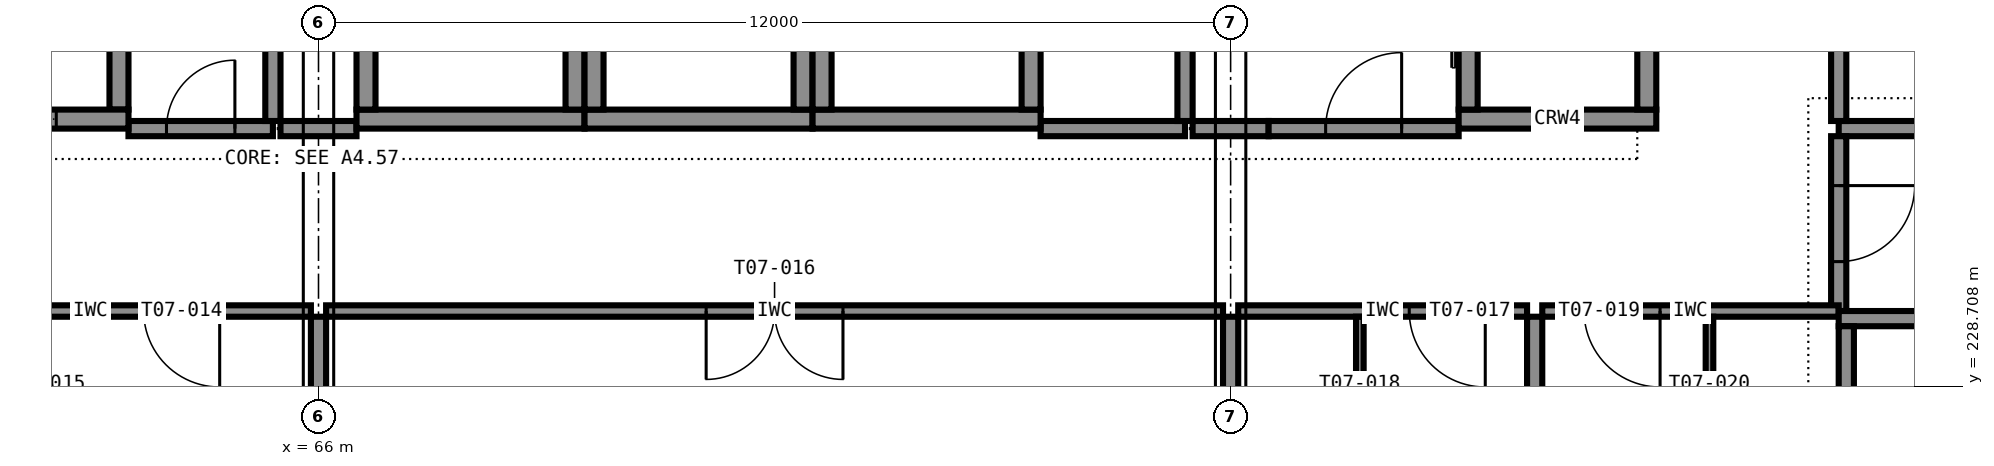
"""IFC4 building model, lengths in metres.
Left out: names, types, materials, properties, quantities, classifications, styles, units other than length and angle.
Written with IfcOpenShell. Run it as: python <this file> out.ifc"""

import sys

from ifc_helpers import new_model, si_unit, direction, frame, frame_2d, origin, place, context, subcontext, project, spatial, rectangle, extrude, element, fill, save


model = new_model("IFC4")
c1 = context("Model", 3, precision=1e-05, world=origin(), true_north=direction((0.0, 1.0)))
c2 = subcontext(c1, "Body", "Model", "MODEL_VIEW")
j1 = project(units=[si_unit("LENGTHUNIT", "METRE"), si_unit("PLANEANGLEUNIT", "RADIAN")], contexts=[c1])
p1 = place(None, origin())
s1 = spatial("IfcSite", under=j1, at=p1, CompositionType="ELEMENT")
p2 = place(p1, origin())
s2 = spatial("IfcBuilding", under=s1, at=p2, CompositionType="ELEMENT")
p3 = place(p2, frame((0.0, 0.0, 31.8)))
s3 = spatial("IfcBuildingStorey", under=s2, at=p3, CompositionType="ELEMENT", Elevation=31.8)
p4 = place(p3, frame((60.5, 232.225, 0.0), z_axis=(0.0, 0.0, 1.0), x_axis=(1.0, 0.0, 0.0)))
e1 = element("IfcWall", 1, at=p4, inside=s3, PredefinedType="SHEAR", context=c2, shape_type="SweptSolid", body=[
    extrude(rectangle(XDim=3.0, YDim=0.25, at=frame_2d((1.5, 0.0))), origin(), (0.0, 0.0, 1.0), 3.6),
])
p5 = place(p4, frame((0.95, 0.0, 0.0)))
e2 = element("IfcOpeningElement", 2, at=p5, cuts=e1, PredefinedType="OPENING", context=c2, shape_type="SweptSolid", body=[
    extrude(rectangle(XDim=1.1, YDim=2.1, at=frame_2d((0.55, 1.05))), frame((0.0, 0.135, 0.0), z_axis=(0.0, -1.0, 0.0), x_axis=(1.0, 0.0, 0.0)), (0.0, 0.0, 1.0), 0.27),
])
p6 = place(p3, frame((63.375, 232.35, 0.0), z_axis=(0.0, 0.0, 1.0), x_axis=(0.0, 1.0, 0.0)))
e3 = element("IfcWall", 3, at=p6, inside=s3, PredefinedType="SHEAR", context=c2, shape_type="SweptSolid", body=[
    extrude(rectangle(XDim=3.3, YDim=0.25, at=frame_2d((1.65, 0.0))), origin(), (0.0, 0.0, 1.0), 3.6),
])
p7 = place(p3, frame((66.5, 232.225, 0.0), z_axis=(0.0, 0.0, 1.0), x_axis=(1.0, 0.0, 0.0)))
e4 = element("IfcWall", 4, at=p7, inside=s3, PredefinedType="SHEAR", context=c2, shape_type="SweptSolid", body=[
    extrude(rectangle(XDim=3.0, YDim=0.25, at=frame_2d((1.5, 0.0))), origin(), (0.0, 0.0, 1.0), 3.6),
])
for number, where, z_axis, x_axis in (
    (5, (66.625, 232.35, 0.0), (0.0, 0.0, 1.0), (0.0, 1.0, 0.0)),
    (6, (69.375, 232.35, 0.0), (0.0, 0.0, 1.0), (0.0, 1.0, 0.0)),
):
    element("IfcWall", number, at=place(p3, frame(where, z_axis=z_axis, x_axis=x_axis)), inside=s3, PredefinedType="SHEAR", context=c2, shape_type="SweptSolid", body=[
        extrude(rectangle(XDim=3.3, YDim=0.25, at=frame_2d((1.65, 0.0))), origin(), (0.0, 0.0, 1.0), 3.6),
    ])
p8 = place(p3, frame((69.5, 232.225, 0.0), z_axis=(0.0, 0.0, 1.0), x_axis=(1.0, 0.0, 0.0)))
e7 = element("IfcWall", 7, at=p8, inside=s3, PredefinedType="SHEAR", context=c2, shape_type="SweptSolid", body=[
    extrude(rectangle(XDim=3.0, YDim=0.25, at=frame_2d((1.5, 0.0))), origin(), (0.0, 0.0, 1.0), 3.6),
])
for number, where, z_axis, x_axis in (
    (8, (69.625, 232.35, 0.0), (0.0, 0.0, 1.0), (0.0, 1.0, 0.0)),
    (9, (72.375, 232.35, 0.0), (0.0, 0.0, 1.0), (0.0, 1.0, 0.0)),
):
    element("IfcWall", number, at=place(p3, frame(where, z_axis=z_axis, x_axis=x_axis)), inside=s3, PredefinedType="SHEAR", context=c2, shape_type="SweptSolid", body=[
        extrude(rectangle(XDim=3.3, YDim=0.25, at=frame_2d((1.65, 0.0))), origin(), (0.0, 0.0, 1.0), 3.6),
    ])
p9 = place(p3, frame((72.5, 232.225, 0.0), z_axis=(0.0, 0.0, 1.0), x_axis=(1.0, 0.0, 0.0)))
e10 = element("IfcWall", 10, at=p9, inside=s3, PredefinedType="SHEAR", context=c2, shape_type="SweptSolid", body=[
    extrude(rectangle(XDim=3.0, YDim=0.25, at=frame_2d((1.5, 0.0))), origin(), (0.0, 0.0, 1.0), 3.6),
])
for number, where, z_axis, x_axis in (
    (11, (72.625, 232.35, 0.0), (0.0, 0.0, 1.0), (0.0, 1.0, 0.0)),
    (12, (75.375, 232.35, 0.0), (0.0, 0.0, 1.0), (0.0, 1.0, 0.0)),
):
    element("IfcWall", number, at=place(p3, frame(where, z_axis=z_axis, x_axis=x_axis)), inside=s3, PredefinedType="SHEAR", context=c2, shape_type="SweptSolid", body=[
        extrude(rectangle(XDim=3.3, YDim=0.25, at=frame_2d((1.65, 0.0))), origin(), (0.0, 0.0, 1.0), 3.6),
    ])
p10 = place(p3, frame((81.0, 232.225, 0.0), z_axis=(0.0, 0.0, 1.0), x_axis=(1.0, 0.0, 0.0)))
e13 = element("IfcWall", 13, at=p10, inside=s3, PredefinedType="SHEAR", context=c2, shape_type="SweptSolid", body=[
    extrude(rectangle(XDim=2.6, YDim=0.25, at=frame_2d((1.3, 0.0))), origin(), (0.0, 0.0, 1.0), 3.6),
])
p11 = place(p3, frame((81.125, 232.35, 0.0), z_axis=(0.0, 0.0, 1.0), x_axis=(0.0, 1.0, 0.0)))
e14 = element("IfcWall", 14, at=p11, inside=s3, PredefinedType="SHEAR", context=c2, shape_type="SweptSolid", body=[
    extrude(rectangle(XDim=3.3, YDim=0.25, at=frame_2d((1.65, 0.0))), origin(), (0.0, 0.0, 1.0), 3.6),
])
p12 = place(p11, frame((1.1, 0.0, 0.0)))
e15 = element("IfcOpeningElement", 15, at=p12, cuts=e14, PredefinedType="OPENING", context=c2, shape_type="SweptSolid", body=[
    extrude(rectangle(XDim=1.1, YDim=2.1, at=frame_2d((0.55, 1.05))), frame((0.0, 0.135, 0.0), z_axis=(0.0, -1.0, 0.0), x_axis=(1.0, 0.0, 0.0)), (0.0, 0.0, 1.0), 0.27),
])
p13 = place(p3, frame((83.475, 232.35, 0.0), z_axis=(0.0, 0.0, 1.0), x_axis=(0.0, 1.0, 0.0)))
e16 = element("IfcWall", 16, at=p13, inside=s3, PredefinedType="SHEAR", context=c2, shape_type="SweptSolid", body=[
    extrude(rectangle(XDim=3.3, YDim=0.25, at=frame_2d((1.65, 0.0))), origin(), (0.0, 0.0, 1.0), 3.6),
])
p14 = place(p3, frame((89.5, 229.6, 0.0), z_axis=(0.0, 0.0, 1.0), x_axis=(-1.0, 0.0, 0.0)))
e17 = element("IfcWall", 17, at=p14, inside=s3, PredefinedType="SHEAR", context=c2, shape_type="SweptSolid", body=[
    extrude(rectangle(XDim=3.5, YDim=0.2, at=frame_2d((1.75, 0.0))), origin(), (0.0, 0.0, 1.0), 3.6),
])
p15 = place(p14, frame((1.15, 0.0, 0.0)))
e18 = element("IfcOpeningElement", 18, at=p15, cuts=e17, PredefinedType="OPENING", context=c2, shape_type="SweptSolid", body=[
    extrude(rectangle(XDim=1.2, YDim=2.1, at=frame_2d((0.6, 1.05))), frame((0.0, 0.11, 0.0), z_axis=(0.0, -1.0, 0.0), x_axis=(1.0, 0.0, 0.0)), (0.0, 0.0, 1.0), 0.22),
])
p16 = place(p3, frame((86.1, 222.0, 0.0), z_axis=(0.0, 0.0, 1.0), x_axis=(0.0, 1.0, 0.0)))
e19 = element("IfcWall", 19, at=p16, inside=s3, PredefinedType="SHEAR", context=c2, shape_type="SweptSolid", body=[
    extrude(rectangle(XDim=7.5, YDim=0.2, at=frame_2d((3.75, 0.0))), origin(), (0.0, 0.0, 1.0), 3.6),
])
p17 = place(p3, frame((63.5, 232.1, 0.0), z_axis=(0.0, 0.0, 1.0), x_axis=(1.0, 0.0, 0.0)))
e20 = element("IfcWall", 20, at=p17, inside=s3, PredefinedType="PARTITIONING", context=c2, shape_type="SweptSolid", body=[
    extrude(rectangle(XDim=1.9, YDim=0.2, at=frame_2d((0.95, 0.0))), origin(), (0.0, 0.0, 1.0), 3.4),
])
p18 = place(p17, frame((0.5, 0.0, 0.0)))
e21 = element("IfcOpeningElement", 21, at=p18, cuts=e20, PredefinedType="OPENING", context=c2, shape_type="SweptSolid", body=[
    extrude(rectangle(XDim=0.9, YDim=2.1, at=frame_2d((0.45, 1.05))), frame((0.0, 0.11, 0.0), z_axis=(0.0, -1.0, 0.0), x_axis=(1.0, 0.0, 0.0)), (0.0, 0.0, 1.0), 0.22),
])
p19 = place(p3, frame((65.5, 232.1, 0.0), z_axis=(0.0, 0.0, 1.0), x_axis=(1.0, 0.0, 0.0)))
e22 = element("IfcWall", 22, at=p19, inside=s3, PredefinedType="PARTITIONING", context=c2, shape_type="SweptSolid", body=[
    extrude(rectangle(XDim=1.0, YDim=0.2, at=frame_2d((0.5, 0.0))), origin(), (0.0, 0.0, 1.0), 3.4),
])
p20 = place(p3, frame((75.5, 232.1, 0.0), z_axis=(0.0, 0.0, 1.0), x_axis=(1.0, 0.0, 0.0)))
e23 = element("IfcWall", 23, at=p20, inside=s3, PredefinedType="PARTITIONING", context=c2, shape_type="SweptSolid", body=[
    extrude(rectangle(XDim=1.9, YDim=0.2, at=frame_2d((0.95, 0.0))), origin(), (0.0, 0.0, 1.0), 3.4),
])
p21 = place(p3, frame((77.5, 232.1, 0.0), z_axis=(0.0, 0.0, 1.0), x_axis=(1.0, 0.0, 0.0)))
e24 = element("IfcWall", 24, at=p21, inside=s3, PredefinedType="PARTITIONING", context=c2, shape_type="SweptSolid", body=[
    extrude(rectangle(XDim=1.0, YDim=0.2, at=frame_2d((0.5, 0.0))), origin(), (0.0, 0.0, 1.0), 3.4),
])
p22 = place(p3, frame((78.5, 232.1, 0.0), z_axis=(0.0, 0.0, 1.0), x_axis=(1.0, 0.0, 0.0)))
e25 = element("IfcWall", 25, at=p22, inside=s3, PredefinedType="PARTITIONING", context=c2, shape_type="SweptSolid", body=[
    extrude(rectangle(XDim=2.5, YDim=0.2, at=frame_2d((1.25, 0.0))), origin(), (0.0, 0.0, 1.0), 3.4),
])
p23 = place(p22, frame((0.75, 0.0, 0.0)))
e26 = element("IfcOpeningElement", 26, at=p23, cuts=e25, PredefinedType="OPENING", context=c2, shape_type="SweptSolid", body=[
    extrude(rectangle(XDim=1.0, YDim=2.1, at=frame_2d((0.5, 1.05))), frame((0.0, 0.11, 0.0), z_axis=(0.0, -1.0, 0.0), x_axis=(1.0, 0.0, 0.0)), (0.0, 0.0, 1.0), 0.22),
])
p24 = place(p3, frame((86.0, 232.1, 0.0), z_axis=(0.0, 0.0, 1.0), x_axis=(1.0, 0.0, 0.0)))
e27 = element("IfcWall", 27, at=p24, inside=s3, PredefinedType="PARTITIONING", context=c2, shape_type="SweptSolid", body=[
    extrude(rectangle(XDim=3.7, YDim=0.2, at=frame_2d((1.85, 0.0))), origin(), (0.0, 0.0, 1.0), 3.4),
])
for number, where, z_axis, x_axis in (
    (28, (65.4, 232.2, 0.0), (0.0, 0.0, 1.0), (0.0, 1.0, 0.0)),
    (29, (77.4, 232.2, 0.0), (0.0, 0.0, 1.0), (0.0, 1.0, 0.0)),
):
    element("IfcWall", number, at=place(p3, frame(where, z_axis=z_axis, x_axis=x_axis)), inside=s3, PredefinedType="PARTITIONING", context=c2, shape_type="SweptSolid", body=[
        extrude(rectangle(XDim=3.6, YDim=0.2, at=frame_2d((1.8, 0.0))), origin(), (0.0, 0.0, 1.0), 3.4),
    ])
p25 = place(p3, frame((86.0, 235.8, 0.0), z_axis=(0.0, 0.0, 1.0), x_axis=(0.0, -1.0, 0.0)))
e30 = element("IfcWall", 30, at=p25, inside=s3, PredefinedType="PARTITIONING", context=c2, shape_type="SweptSolid", body=[
    extrude(rectangle(XDim=3.6, YDim=0.2, at=frame_2d((1.8, 0.0))), origin(), (0.0, 0.0, 1.0), 3.4),
])
p26 = place(p25, frame((1.35, 0.0, 0.0)))
e31 = element("IfcOpeningElement", 31, at=p26, cuts=e30, PredefinedType="OPENING", context=c2, shape_type="SweptSolid", body=[
    extrude(rectangle(XDim=0.9, YDim=2.1, at=frame_2d((0.45, 1.05))), frame((0.0, 0.11, 0.0), z_axis=(0.0, -1.0, 0.0), x_axis=(1.0, 0.0, 0.0)), (0.0, 0.0, 1.0), 0.22),
])
p27 = place(p3, frame((86.0, 232.0, 0.0), z_axis=(0.0, 0.0, 1.0), x_axis=(0.0, -1.0, 0.0)))
e32 = element("IfcWall", 32, at=p27, inside=s3, PredefinedType="PARTITIONING", context=c2, shape_type="SweptSolid", body=[
    extrude(rectangle(XDim=2.3, YDim=0.2, at=frame_2d((1.15, 0.0))), origin(), (0.0, 0.0, 1.0), 3.4),
])
p28 = place(p27, frame((0.65, 0.0, 0.0)))
e33 = element("IfcOpeningElement", 33, at=p28, cuts=e32, PredefinedType="OPENING", context=c2, shape_type="SweptSolid", body=[
    extrude(rectangle(XDim=1.0, YDim=2.1, at=frame_2d((0.5, 1.05))), frame((0.0, 0.11, 0.0), z_axis=(0.0, -1.0, 0.0), x_axis=(1.0, 0.0, 0.0)), (0.0, 0.0, 1.0), 0.22),
])
p29 = place(p3, frame((65.9, 229.7, 0.0), z_axis=(0.0, 0.0, 1.0), x_axis=(-1.0, 0.0, 0.0)))
e34 = element("IfcWall", 34, at=p29, inside=s3, PredefinedType="PARTITIONING", context=c2, shape_type="SweptSolid", body=[
    extrude(rectangle(XDim=5.8, YDim=0.15, at=frame_2d((2.9, 0.0))), origin(), (0.0, 0.0, 1.0), 3.4),
])
p30 = place(p29, frame((1.2, 0.0, 0.0)))
e35 = element("IfcOpeningElement", 35, at=p30, cuts=e34, PredefinedType="OPENING", context=c2, shape_type="SweptSolid", body=[
    extrude(rectangle(XDim=1.0, YDim=2.1, at=frame_2d((0.5, 1.05))), frame((0.0, 0.085, 0.0), z_axis=(0.0, -1.0, 0.0), x_axis=(1.0, 0.0, 0.0)), (0.0, 0.0, 1.0), 0.17),
])
p31 = place(p3, frame((77.9, 229.7, 0.0), z_axis=(0.0, 0.0, 1.0), x_axis=(-1.0, 0.0, 0.0)))
e36 = element("IfcWall", 36, at=p31, inside=s3, PredefinedType="PARTITIONING", context=c2, shape_type="SweptSolid", body=[
    extrude(rectangle(XDim=11.8, YDim=0.15, at=frame_2d((5.9, 0.0))), origin(), (0.0, 0.0, 1.0), 3.4),
])
p32 = place(p31, frame((5.0, 0.0, 0.0)))
e37 = element("IfcOpeningElement", 37, at=p32, cuts=e36, PredefinedType="OPENING", context=c2, shape_type="SweptSolid", body=[
    extrude(rectangle(XDim=1.8, YDim=2.1, at=frame_2d((0.9, 1.05))), frame((0.0, 0.085, 0.0), z_axis=(0.0, -1.0, 0.0), x_axis=(1.0, 0.0, 0.0)), (0.0, 0.0, 1.0), 0.17),
])
p33 = place(p3, frame((81.9, 229.7, 0.0), z_axis=(0.0, 0.0, 1.0), x_axis=(-1.0, 0.0, 0.0)))
e38 = element("IfcWall", 38, at=p33, inside=s3, PredefinedType="PARTITIONING", context=c2, shape_type="SweptSolid", body=[
    extrude(rectangle(XDim=3.8, YDim=0.15, at=frame_2d((1.9, 0.0))), origin(), (0.0, 0.0, 1.0), 3.4),
])
p34 = place(p33, frame((0.55, 0.0, 0.0)))
e39 = element("IfcOpeningElement", 39, at=p34, cuts=e38, PredefinedType="OPENING", context=c2, shape_type="SweptSolid", body=[
    extrude(rectangle(XDim=1.0, YDim=2.1, at=frame_2d((0.5, 1.05))), frame((0.0, 0.085, 0.0), z_axis=(0.0, -1.0, 0.0), x_axis=(1.0, 0.0, 0.0)), (0.0, 0.0, 1.0), 0.17),
])
p35 = place(p3, frame((79.7, 229.625, 0.0), z_axis=(0.0, 0.0, 1.0), x_axis=(0.0, -1.0, 0.0)))
e40 = element("IfcWall", 40, at=p35, inside=s3, PredefinedType="PARTITIONING", context=c2, shape_type="SweptSolid", body=[
    extrude(rectangle(XDim=2.875, YDim=0.1, at=frame_2d((1.438, 0.0))), origin(), (0.0, 0.0, 1.0), 3.4),
])
p36 = place(p35, frame((1.038, 0.0, 0.0)))
e41 = element("IfcOpeningElement", 41, at=p36, cuts=e40, PredefinedType="OPENING", context=c2, shape_type="SweptSolid", body=[
    extrude(rectangle(XDim=0.8, YDim=2.1, at=frame_2d((0.4, 1.05))), frame((0.0, 0.06, 0.0), z_axis=(0.0, -1.0, 0.0), x_axis=(1.0, 0.0, 0.0)), (0.0, 0.0, 1.0), 0.12),
])
p37 = place(p3, frame((86.0, 229.7, 0.0), z_axis=(0.0, 0.0, 1.0), x_axis=(-1.0, 0.0, 0.0)))
e42 = element("IfcWall", 42, at=p37, inside=s3, PredefinedType="PARTITIONING", context=c2, shape_type="SweptSolid", body=[
    extrude(rectangle(XDim=3.9, YDim=0.15, at=frame_2d((1.95, 0.0))), origin(), (0.0, 0.0, 1.0), 3.4),
])
p38 = place(p37, frame((2.35, 0.0, 0.0)))
e43 = element("IfcOpeningElement", 43, at=p38, cuts=e42, PredefinedType="OPENING", context=c2, shape_type="SweptSolid", body=[
    extrude(rectangle(XDim=1.0, YDim=2.1, at=frame_2d((0.5, 1.05))), frame((0.0, 0.085, 0.0), z_axis=(0.0, -1.0, 0.0), x_axis=(1.0, 0.0, 0.0)), (0.0, 0.0, 1.0), 0.17),
])
p39 = place(p3, frame((84.3, 226.75, 0.0), z_axis=(0.0, 0.0, 1.0), x_axis=(0.0, 1.0, 0.0)))
e44 = element("IfcWall", 44, at=p39, inside=s3, PredefinedType="PARTITIONING", context=c2, shape_type="SweptSolid", body=[
    extrude(rectangle(XDim=2.875, YDim=0.1, at=frame_2d((1.438, 0.0))), origin(), (0.0, 0.0, 1.0), 3.4),
])
p40 = place(p39, frame((1.038, 0.0, 0.0)))
e45 = element("IfcOpeningElement", 45, at=p40, cuts=e44, PredefinedType="OPENING", context=c2, shape_type="SweptSolid", body=[
    extrude(rectangle(XDim=0.8, YDim=2.1, at=frame_2d((0.4, 1.05))), frame((0.0, 0.06, 0.0), z_axis=(0.0, -1.0, 0.0), x_axis=(1.0, 0.0, 0.0)), (0.0, 0.0, 1.0), 0.12),
])
for number, where, z_axis, x_axis in (
    (46, (66.0, 222.45, 0.0), (0.0, 0.0, 1.0), (0.0, 1.0, 0.0)),
    (47, (78.0, 222.45, 0.0), (0.0, 0.0, 1.0), (0.0, 1.0, 0.0)),
):
    element("IfcWall", number, at=place(p3, frame(where, z_axis=z_axis, x_axis=x_axis)), inside=s3, PredefinedType="PARTITIONING", context=c2, shape_type="SweptSolid", body=[
        extrude(rectangle(XDim=7.175, YDim=0.2, at=frame_2d((3.587, 0.0))), origin(), (0.0, 0.0, 1.0), 2.6),
    ])
p41 = place(p3, frame((82.0, 222.3, 0.0), z_axis=(0.0, 0.0, 1.0), x_axis=(0.0, 1.0, 0.0)))
e48 = element("IfcWall", 48, at=p41, inside=s3, PredefinedType="PARTITIONING", context=c2, shape_type="SweptSolid", body=[
    extrude(rectangle(XDim=7.325, YDim=0.2, at=frame_2d((3.663, 0.0))), origin(), (0.0, 0.0, 1.0), 3.4),
])
p42 = place(p18, origin())
e49 = element("IfcDoor", 49, at=p42, inside=s3, OperationType="SINGLE_SWING_RIGHT", PredefinedType="DOOR", context=c2, shape_type="SweptSolid", body=[
    extrude(rectangle(XDim=0.9, YDim=2.1, at=frame_2d((0.45, 1.05))), frame((0.0, 0.025, 0.0), z_axis=(0.0, -1.0, 0.0), x_axis=(1.0, 0.0, 0.0)), (0.0, 0.0, 1.0), 0.05),
])
fill(e21, e49)
p43 = place(p23, origin())
e50 = element("IfcDoor", 50, at=p43, inside=s3, OperationType="SINGLE_SWING_RIGHT", PredefinedType="DOOR", context=c2, shape_type="SweptSolid", body=[
    extrude(rectangle(XDim=1.0, YDim=2.1, at=frame_2d((0.5, 1.05))), frame((0.0, 0.025, 0.0), z_axis=(0.0, -1.0, 0.0), x_axis=(1.0, 0.0, 0.0)), (0.0, 0.0, 1.0), 0.05),
])
fill(e26, e50)
p44 = place(p28, origin())
e51 = element("IfcDoor", 51, at=p44, inside=s3, OperationType="SINGLE_SWING_LEFT", PredefinedType="DOOR", context=c2, shape_type="SweptSolid", body=[
    extrude(rectangle(XDim=1.0, YDim=2.1, at=frame_2d((0.5, 1.05))), frame((0.0, 0.025, 0.0), z_axis=(0.0, -1.0, 0.0), x_axis=(1.0, 0.0, 0.0)), (0.0, 0.0, 1.0), 0.05),
])
fill(e33, e51)
p45 = place(p30, origin())
e52 = element("IfcDoor", 52, at=p45, inside=s3, OperationType="SINGLE_SWING_LEFT", PredefinedType="DOOR", context=c2, shape_type="SweptSolid", body=[
    extrude(rectangle(XDim=1.0, YDim=2.1, at=frame_2d((0.5, 1.05))), frame((0.0, 0.025, 0.0), z_axis=(0.0, -1.0, 0.0), x_axis=(1.0, 0.0, 0.0)), (0.0, 0.0, 1.0), 0.05),
])
fill(e35, e52)
p46 = place(p32, origin())
e53 = element("IfcDoor", 53, at=p46, inside=s3, OperationType="DOUBLE_DOOR_SINGLE_SWING", PredefinedType="DOOR", context=c2, shape_type="SweptSolid", body=[
    extrude(rectangle(XDim=1.8, YDim=2.1, at=frame_2d((0.9, 1.05))), frame((0.0, 0.025, 0.0), z_axis=(0.0, -1.0, 0.0), x_axis=(1.0, 0.0, 0.0)), (0.0, 0.0, 1.0), 0.05),
])
fill(e37, e53)
p47 = place(p34, origin())
e54 = element("IfcDoor", 54, at=p47, inside=s3, OperationType="SINGLE_SWING_LEFT", PredefinedType="DOOR", context=c2, shape_type="SweptSolid", body=[
    extrude(rectangle(XDim=1.0, YDim=2.1, at=frame_2d((0.5, 1.05))), frame((0.0, 0.025, 0.0), z_axis=(0.0, -1.0, 0.0), x_axis=(1.0, 0.0, 0.0)), (0.0, 0.0, 1.0), 0.05),
])
fill(e39, e54)
p48 = place(p38, origin())
e55 = element("IfcDoor", 55, at=p48, inside=s3, OperationType="SINGLE_SWING_LEFT", PredefinedType="DOOR", context=c2, shape_type="SweptSolid", body=[
    extrude(rectangle(XDim=1.0, YDim=2.1, at=frame_2d((0.5, 1.05))), frame((0.0, 0.025, 0.0), z_axis=(0.0, -1.0, 0.0), x_axis=(1.0, 0.0, 0.0)), (0.0, 0.0, 1.0), 0.05),
])
fill(e43, e55)
p49 = place(p5, origin())
e56 = element("IfcDoor", 56, at=p49, inside=s3, OperationType="SLIDING_TO_LEFT", PredefinedType="DOOR", context=c2, shape_type="SweptSolid", body=[
    extrude(rectangle(XDim=1.1, YDim=2.1, at=frame_2d((0.55, 1.05))), frame((0.0, 0.025, 0.0), z_axis=(0.0, -1.0, 0.0), x_axis=(1.0, 0.0, 0.0)), (0.0, 0.0, 1.0), 0.05),
])
fill(e2, e56)
save(model, sys.argv[1])
